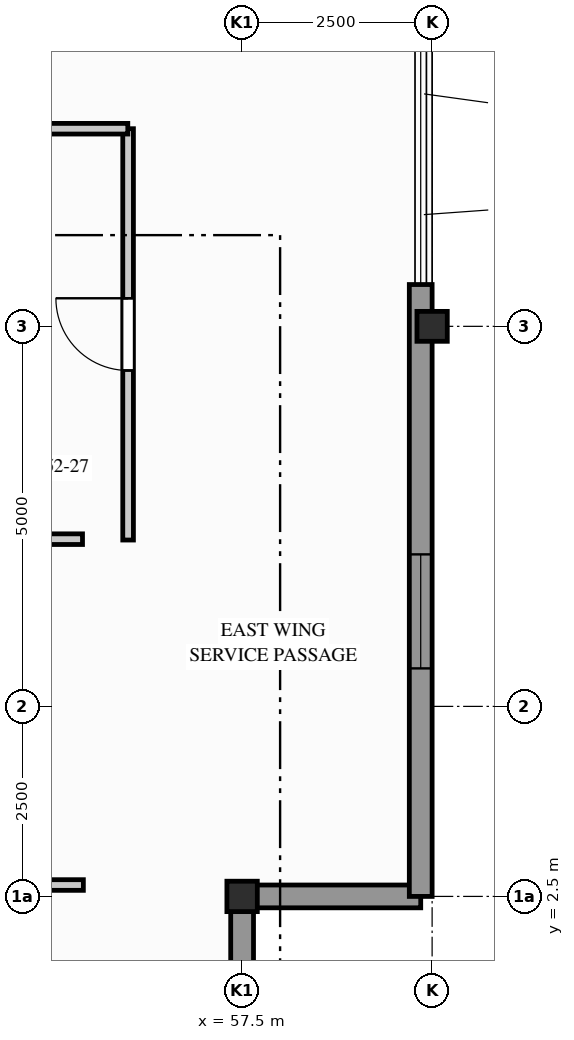
"""IFC4 building model, lengths in metres.
Left out: names, types, materials, properties, quantities, classifications, styles, units other than length and angle.
Written with IfcOpenShell. Run it as: python <this file> out.ifc"""

import sys

from ifc_helpers import new_model, si_unit, direction, frame, frame_2d, origin, origin_2d, place, context, subcontext, project, spatial, rectangle, hollow_rectangle, i_section, extrude, element, fill, save


model = new_model("IFC4")
c1 = context("Model", 3, precision=1e-05, world=origin(), true_north=direction((0.0, 1.0)))
c2 = subcontext(c1, "Body", "Model", "MODEL_VIEW")
j1 = project(units=[si_unit("LENGTHUNIT", "METRE"), si_unit("PLANEANGLEUNIT", "RADIAN")], contexts=[c1])
p1 = place(None, origin())
s1 = spatial("IfcSite", under=j1, at=p1, CompositionType="ELEMENT")
p2 = place(p1, origin())
s2 = spatial("IfcBuilding", under=s1, at=p2, CompositionType="ELEMENT")
p3 = place(p2, frame((0.0, 0.0, 172.8)))
s3 = spatial("IfcBuildingStorey", under=s2, at=p3, CompositionType="ELEMENT", Elevation=172.8)
p4 = place(p3, frame((57.5, 2.5, 0.0), z_axis=(0.0, 0.0, 1.0), x_axis=(1.0, 0.0, 0.0)))
e1 = element("IfcColumn", 1, at=p4, inside=s3, PredefinedType="COLUMN", context=c2, shape_type="SweptSolid", body=[
    extrude(hollow_rectangle(XDim=0.4, YDim=0.4, WallThickness=0.02, InnerFilletRadius=0.012, OuterFilletRadius=0.024, at=origin_2d()), origin(), (0.0, 0.0, 1.0), 3.1),
])
p5 = place(p3, frame((60.0, 10.0, 0.0), z_axis=(0.0, 0.0, 1.0), x_axis=(1.0, 0.0, 0.0)))
e2 = element("IfcColumn", 2, at=p5, inside=s3, PredefinedType="COLUMN", context=c2, shape_type="SweptSolid", body=[
    extrude(i_section(OverallWidth=0.399, OverallDepth=0.394, WebThickness=0.023, FlangeThickness=0.037, FilletRadius=0.015, at=origin_2d()), origin(), (0.0, 0.0, 1.0), 3.1),
])
for number, where, z_axis, x_axis in (
    (3, (57.5, 0.15, 0.0), (0.0, 0.0, 1.0), (0.0, 1.0, 0.0)),
    (4, (57.5, 2.5, 0.0), (0.0, 0.0, 1.0), (1.0, 0.0, 0.0)),
):
    element("IfcWall", number, at=place(p3, frame(where, z_axis=z_axis, x_axis=x_axis)), inside=s3, PredefinedType="STANDARD", context=c2, shape_type="SweptSolid", body=[
        extrude(rectangle(XDim=2.35, YDim=0.3, at=frame_2d((1.175, 0.0))), origin(), (0.0, 0.0, 1.0), 2.89),
    ])
p6 = place(p3, frame((59.85, 2.5, 0.0), z_axis=(0.0, 0.0, 1.0), x_axis=(0.0, 1.0, 0.0)))
e5 = element("IfcWall", 5, at=p6, inside=s3, PredefinedType="STANDARD", context=c2, shape_type="SweptSolid", body=[
    extrude(rectangle(XDim=8.05, YDim=0.3, at=frame_2d((4.025, 0.0))), origin(), (0.0, 0.0, 1.0), 2.89),
])
p7 = place(p6, frame((3.0, 0.0, 0.87)))
e6 = element("IfcOpeningElement", 6, at=p7, cuts=e5, PredefinedType="OPENING", context=c2, shape_type="SweptSolid", body=[
    extrude(rectangle(XDim=1.5, YDim=1.8, at=frame_2d((0.75, 0.9))), frame((0.0, 0.16, 0.0), z_axis=(0.0, -1.0, 0.0), x_axis=(1.0, 0.0, 0.0)), (0.0, 0.0, 1.0), 0.32),
])
p8 = place(p3, frame((56.0, 7.189, 0.0), z_axis=(0.0, 0.0, 1.0), x_axis=(0.0, 1.0, 0.0)))
e7 = element("IfcWall", 7, at=p8, inside=s3, PredefinedType="PARTITIONING", context=c2, shape_type="SweptSolid", body=[
    extrude(rectangle(XDim=5.411, YDim=0.14, at=frame_2d((2.706, 0.0))), origin(), (0.0, 0.0, 1.0), 2.253),
])
p9 = place(p8, frame((2.231, 0.0, 0.0)))
e8 = element("IfcOpeningElement", 8, at=p9, cuts=e7, PredefinedType="OPENING", context=c2, shape_type="SweptSolid", body=[
    extrude(rectangle(XDim=0.95, YDim=2.05, at=frame_2d((0.475, 1.025))), frame((0.0, 0.08, 0.0), z_axis=(0.0, -1.0, 0.0), x_axis=(1.0, 0.0, 0.0)), (0.0, 0.0, 1.0), 0.16),
])
p10 = place(p3, frame((52.893, 2.65, 0.0), z_axis=(0.0, 0.0, 1.0), x_axis=(1.0, 0.0, 0.0)))
e9 = element("IfcWall", 9, at=p10, inside=s3, PredefinedType="PARTITIONING", context=c2, shape_type="SweptSolid", body=[
    extrude(rectangle(XDim=2.519, YDim=0.14, at=frame_2d((1.259, 0.0))), origin(), (0.0, 0.0, 1.0), 2.253),
])
p11 = place(p10, frame((0.734, 0.0, 0.0)))
e10 = element("IfcOpeningElement", 10, at=p11, cuts=e9, PredefinedType="OPENING", context=c2, shape_type="SweptSolid", body=[
    extrude(rectangle(XDim=1.05, YDim=2.06, at=frame_2d((0.525, 1.03))), frame((0.0, 0.08, 0.0), z_axis=(0.0, -1.0, 0.0), x_axis=(1.0, 0.0, 0.0)), (0.0, 0.0, 1.0), 0.16),
])
p12 = place(p3, frame((54.139, 7.2, 0.0), z_axis=(0.0, 0.0, 1.0), x_axis=(1.0, 0.0, 0.0)))
e11 = element("IfcWall", 11, at=p12, inside=s3, PredefinedType="PARTITIONING", context=c2, shape_type="SweptSolid", body=[
    extrude(rectangle(XDim=1.261, YDim=0.14, at=frame_2d((0.631, 0.0))), origin(), (0.0, 0.0, 1.0), 2.253),
])
p13 = place(p3, frame((54.154, 12.6, 0.0), z_axis=(0.0, 0.0, 1.0), x_axis=(1.0, 0.0, 0.0)))
e12 = element("IfcWall", 12, at=p13, inside=s3, PredefinedType="PARTITIONING", context=c2, shape_type="SweptSolid", body=[
    extrude(rectangle(XDim=1.842, YDim=0.14, at=frame_2d((0.921, 0.0))), origin(), (0.0, 0.0, 1.0), 2.89),
])
p14 = place(p7, origin())
e13 = element("IfcWindow", 13, at=p14, inside=s3, PartitioningType="SINGLE_PANEL", PredefinedType="WINDOW", context=c2, shape_type="SweptSolid", body=[
    extrude(rectangle(XDim=1.5, YDim=1.8, at=frame_2d((0.75, 0.9))), frame((0.0, 0.03, 0.0), z_axis=(0.0, -1.0, 0.0), x_axis=(1.0, 0.0, 0.0)), (0.0, 0.0, 1.0), 0.06),
])
fill(e6, e13)
p15 = place(p9, origin())
e14 = element("IfcDoor", 14, at=p15, inside=s3, OperationType="SINGLE_SWING_RIGHT", PredefinedType="DOOR", context=c2, shape_type="SweptSolid", body=[
    extrude(rectangle(XDim=0.95, YDim=2.05, at=frame_2d((0.475, 1.025))), frame((0.0, 0.025, 0.0), z_axis=(0.0, -1.0, 0.0), x_axis=(1.0, 0.0, 0.0)), (0.0, 0.0, 1.0), 0.05),
])
fill(e8, e14)
save(model, sys.argv[1])
